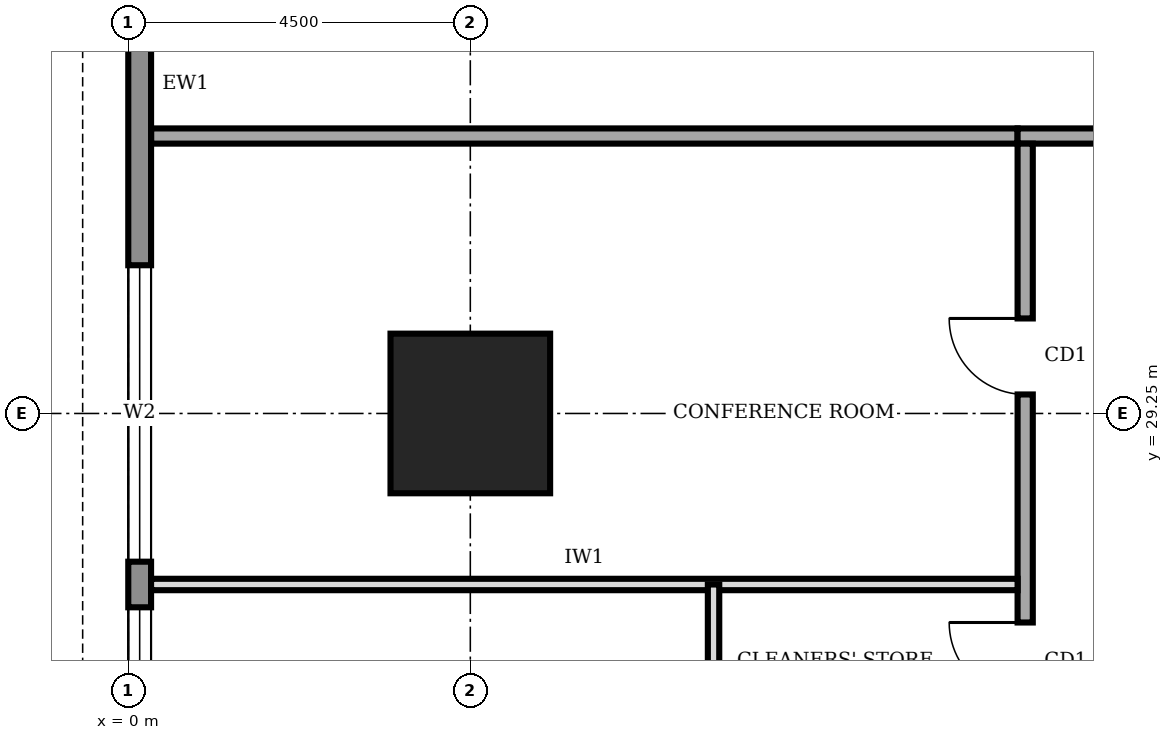
"""IFC4 building model, lengths in metres.
Left out: names, types, materials, properties, quantities, classifications, styles, units other than length and angle.
Written with IfcOpenShell. Run it as: python <this file> out.ifc"""

import sys

from ifc_helpers import new_model, si_unit, direction, frame, frame_2d, origin, origin_2d, place, context, subcontext, project, spatial, rectangle, extrude, element, fill, save


model = new_model("IFC4")
c1 = context("Model", 3, precision=1e-05, world=origin(), true_north=direction((0.0, 1.0)))
c2 = subcontext(c1, "Body", "Model", "MODEL_VIEW")
j1 = project(units=[si_unit("LENGTHUNIT", "METRE"), si_unit("PLANEANGLEUNIT", "RADIAN")], contexts=[c1])
p1 = place(None, origin())
s1 = spatial("IfcSite", under=j1, at=p1, CompositionType="ELEMENT")
p2 = place(p1, origin())
s2 = spatial("IfcBuilding", under=s1, at=p2, CompositionType="ELEMENT")
p3 = place(p2, frame((0.0, 0.0, 149.0)))
s3 = spatial("IfcBuildingStorey", under=s2, at=p3, CompositionType="ELEMENT", Elevation=149.0)
p4 = place(p3, frame((4.5, 29.25, 0.0), z_axis=(0.0, 0.0, 1.0), x_axis=(1.0, 0.0, 0.0)))
e1 = element("IfcColumn", 1, at=p4, inside=s3, PredefinedType="COLUMN", context=c2, shape_type="SweptSolid", body=[
    extrude(rectangle(XDim=2.1, YDim=2.1, at=origin_2d()), origin(), (0.0, 0.0, 1.0), 4.0),
])
p5 = place(p3, frame((0.15, 35.98, 0.0), z_axis=(0.0, 0.0, 1.0), x_axis=(0.0, -1.0, 0.0)))
e2 = element("IfcWall", 2, at=p5, inside=s3, PredefinedType="STANDARD", context=c2, shape_type="SweptSolid", body=[
    extrude(rectangle(XDim=31.46, YDim=0.3, at=frame_2d((15.73, 0.0))), origin(), (0.0, 0.0, 1.0), 3.75),
])
p6 = place(p5, frame((27.28, 0.0, 0.6)))
e3 = element("IfcOpeningElement", 3, at=p6, cuts=e2, PredefinedType="OPENING", context=c2, shape_type="SweptSolid", body=[
    extrude(rectangle(XDim=3.9, YDim=2.6, at=frame_2d((1.95, 1.3))), frame((0.0, 0.16, 0.0), z_axis=(0.0, -1.0, 0.0), x_axis=(1.0, 0.0, 0.0)), (0.0, 0.0, 1.0), 0.32),
])
p7 = place(p5, frame((22.78, 0.0, 0.6)))
e4 = element("IfcOpeningElement", 4, at=p7, cuts=e2, PredefinedType="OPENING", context=c2, shape_type="SweptSolid", body=[
    extrude(rectangle(XDim=3.9, YDim=2.6, at=frame_2d((1.95, 1.3))), frame((0.0, 0.16, 0.0), z_axis=(0.0, -1.0, 0.0), x_axis=(1.0, 0.0, 0.0)), (0.0, 0.0, 1.0), 0.32),
])
p8 = place(p5, frame((18.28, 0.0, 0.6)))
e5 = element("IfcOpeningElement", 5, at=p8, cuts=e2, PredefinedType="OPENING", context=c2, shape_type="SweptSolid", body=[
    extrude(rectangle(XDim=3.9, YDim=2.6, at=frame_2d((1.95, 1.3))), frame((0.0, 0.16, 0.0), z_axis=(0.0, -1.0, 0.0), x_axis=(1.0, 0.0, 0.0)), (0.0, 0.0, 1.0), 0.32),
])
p9 = place(p5, frame((13.78, 0.0, 0.6)))
e6 = element("IfcOpeningElement", 6, at=p9, cuts=e2, PredefinedType="OPENING", context=c2, shape_type="SweptSolid", body=[
    extrude(rectangle(XDim=3.9, YDim=2.6, at=frame_2d((1.95, 1.3))), frame((0.0, 0.16, 0.0), z_axis=(0.0, -1.0, 0.0), x_axis=(1.0, 0.0, 0.0)), (0.0, 0.0, 1.0), 0.32),
])
p10 = place(p5, frame((9.28, 0.0, 0.6)))
e7 = element("IfcOpeningElement", 7, at=p10, cuts=e2, PredefinedType="OPENING", context=c2, shape_type="SweptSolid", body=[
    extrude(rectangle(XDim=3.9, YDim=2.6, at=frame_2d((1.95, 1.3))), frame((0.0, 0.16, 0.0), z_axis=(0.0, -1.0, 0.0), x_axis=(1.0, 0.0, 0.0)), (0.0, 0.0, 1.0), 0.32),
])
p11 = place(p5, frame((4.78, 0.0, 0.6)))
e8 = element("IfcOpeningElement", 8, at=p11, cuts=e2, PredefinedType="OPENING", context=c2, shape_type="SweptSolid", body=[
    extrude(rectangle(XDim=3.9, YDim=2.6, at=frame_2d((1.95, 1.3))), frame((0.0, 0.16, 0.0), z_axis=(0.0, -1.0, 0.0), x_axis=(1.0, 0.0, 0.0)), (0.0, 0.0, 1.0), 0.32),
])
p12 = place(p3, frame((40.2, 32.9, 0.0), z_axis=(0.0, 0.0, 1.0), x_axis=(-1.0, 0.0, 0.0)))
e9 = element("IfcWall", 9, at=p12, inside=s3, PredefinedType="SOLIDWALL", context=c2, shape_type="SweptSolid", body=[
    extrude(rectangle(XDim=28.5, YDim=0.2, at=frame_2d((14.25, 0.0))), origin(), (0.0, 0.0, 1.0), 3.75),
])
p13 = place(p12, frame((24.55, 0.0, 0.0)))
e10 = element("IfcOpeningElement", 10, at=p13, cuts=e9, PredefinedType="OPENING", context=c2, shape_type="SweptSolid", body=[
    extrude(rectangle(XDim=1.8, YDim=2.1, at=frame_2d((0.9, 1.05))), frame((0.0, 0.11, 0.0), z_axis=(0.0, -1.0, 0.0), x_axis=(1.0, 0.0, 0.0)), (0.0, 0.0, 1.0), 0.22),
])
p14 = place(p12, frame((17.2, 0.0, 0.0)))
e11 = element("IfcOpeningElement", 11, at=p14, cuts=e9, PredefinedType="OPENING", context=c2, shape_type="SweptSolid", body=[
    extrude(rectangle(XDim=1.0, YDim=2.1, at=frame_2d((0.5, 1.05))), frame((0.0, 0.11, 0.0), z_axis=(0.0, -1.0, 0.0), x_axis=(1.0, 0.0, 0.0)), (0.0, 0.0, 1.0), 0.22),
])
p15 = place(p12, frame((6.0, 0.0, 0.0)))
e12 = element("IfcOpeningElement", 12, at=p15, cuts=e9, PredefinedType="OPENING", context=c2, shape_type="SweptSolid", body=[
    extrude(rectangle(XDim=1.0, YDim=2.1, at=frame_2d((0.5, 1.05))), frame((0.0, 0.11, 0.0), z_axis=(0.0, -1.0, 0.0), x_axis=(1.0, 0.0, 0.0)), (0.0, 0.0, 1.0), 0.22),
])
p16 = place(p3, frame((11.8, 32.8, 0.0), z_axis=(0.0, 0.0, 1.0), x_axis=(0.0, -1.0, 0.0)))
e13 = element("IfcWall", 13, at=p16, inside=s3, PredefinedType="SOLIDWALL", context=c2, shape_type="SweptSolid", body=[
    extrude(rectangle(XDim=25.3, YDim=0.2, at=frame_2d((12.65, 0.0))), origin(), (0.0, 0.0, 1.0), 3.75),
])
p17 = place(p16, frame((21.8, 0.0, 0.0)))
e14 = element("IfcOpeningElement", 14, at=p17, cuts=e13, PredefinedType="OPENING", context=c2, shape_type="SweptSolid", body=[
    extrude(rectangle(XDim=1.0, YDim=2.1, at=frame_2d((0.5, 1.05))), frame((0.0, 0.11, 0.0), z_axis=(0.0, -1.0, 0.0), x_axis=(1.0, 0.0, 0.0)), (0.0, 0.0, 1.0), 0.22),
])
p18 = place(p16, frame((17.15, 0.0, 0.0)))
e15 = element("IfcOpeningElement", 15, at=p18, cuts=e13, PredefinedType="OPENING", context=c2, shape_type="SweptSolid", body=[
    extrude(rectangle(XDim=0.9, YDim=2.1, at=frame_2d((0.45, 1.05))), frame((0.0, 0.11, 0.0), z_axis=(0.0, -1.0, 0.0), x_axis=(1.0, 0.0, 0.0)), (0.0, 0.0, 1.0), 0.22),
])
p19 = place(p16, frame((12.35, 0.0, 0.0)))
e16 = element("IfcOpeningElement", 16, at=p19, cuts=e13, PredefinedType="OPENING", context=c2, shape_type="SweptSolid", body=[
    extrude(rectangle(XDim=0.9, YDim=2.1, at=frame_2d((0.45, 1.05))), frame((0.0, 0.11, 0.0), z_axis=(0.0, -1.0, 0.0), x_axis=(1.0, 0.0, 0.0)), (0.0, 0.0, 1.0), 0.22),
])
p20 = place(p16, frame((9.3, 0.0, 0.0)))
e17 = element("IfcOpeningElement", 17, at=p20, cuts=e13, PredefinedType="OPENING", context=c2, shape_type="SweptSolid", body=[
    extrude(rectangle(XDim=0.9, YDim=2.1, at=frame_2d((0.45, 1.05))), frame((0.0, 0.11, 0.0), z_axis=(0.0, -1.0, 0.0), x_axis=(1.0, 0.0, 0.0)), (0.0, 0.0, 1.0), 0.22),
])
p21 = place(p16, frame((6.3, 0.0, 0.0)))
e18 = element("IfcOpeningElement", 18, at=p21, cuts=e13, PredefinedType="OPENING", context=c2, shape_type="SweptSolid", body=[
    extrude(rectangle(XDim=1.0, YDim=2.1, at=frame_2d((0.5, 1.05))), frame((0.0, 0.11, 0.0), z_axis=(0.0, -1.0, 0.0), x_axis=(1.0, 0.0, 0.0)), (0.0, 0.0, 1.0), 0.22),
])
p22 = place(p16, frame((14.4, 0.0, 0.0)))
e19 = element("IfcOpeningElement", 19, at=p22, cuts=e13, PredefinedType="OPENING", context=c2, shape_type="SweptSolid", body=[
    extrude(rectangle(XDim=1.0, YDim=2.1, at=frame_2d((0.5, 1.05))), frame((0.0, 0.11, 0.0), z_axis=(0.0, -1.0, 0.0), x_axis=(1.0, 0.0, 0.0)), (0.0, 0.0, 1.0), 0.22),
])
p23 = place(p16, frame((2.3, 0.0, 0.0)))
e20 = element("IfcOpeningElement", 20, at=p23, cuts=e13, PredefinedType="OPENING", context=c2, shape_type="SweptSolid", body=[
    extrude(rectangle(XDim=1.0, YDim=2.1, at=frame_2d((0.5, 1.05))), frame((0.0, 0.11, 0.0), z_axis=(0.0, -1.0, 0.0), x_axis=(1.0, 0.0, 0.0)), (0.0, 0.0, 1.0), 0.22),
])
p24 = place(p3, frame((0.3, 32.9, 0.0), z_axis=(0.0, 0.0, 1.0), x_axis=(1.0, 0.0, 0.0)))
e21 = element("IfcWall", 21, at=p24, inside=s3, PredefinedType="SOLIDWALL", context=c2, shape_type="SweptSolid", body=[
    extrude(rectangle(XDim=11.4, YDim=0.2, at=frame_2d((5.7, 0.0))), origin(), (0.0, 0.0, 1.0), 3.75),
])
p25 = place(p3, frame((0.3, 27.0, 0.0), z_axis=(0.0, 0.0, 1.0), x_axis=(1.0, 0.0, 0.0)))
e22 = element("IfcWall", 22, at=p25, inside=s3, PredefinedType="PARTITIONING", context=c2, shape_type="SweptSolid", body=[
    extrude(rectangle(XDim=11.4, YDim=0.15, at=frame_2d((5.7, 0.0))), origin(), (0.0, 0.0, 1.0), 3.75),
])
p26 = place(p3, frame((7.7, 25.0, 0.0), z_axis=(0.0, 0.0, 1.0), x_axis=(0.0, 1.0, 0.0)))
e23 = element("IfcWall", 23, at=p26, inside=s3, PredefinedType="PARTITIONING", context=c2, shape_type="SweptSolid", body=[
    extrude(rectangle(XDim=2.0, YDim=0.15, at=frame_2d((1.0, 0.0))), origin(), (0.0, 0.0, 1.0), 3.75),
])
p27 = place(p10, origin())
e24 = element("IfcWindow", 24, at=p27, inside=s3, PartitioningType="SINGLE_PANEL", PredefinedType="WINDOW", context=c2, shape_type="SweptSolid", body=[
    extrude(rectangle(XDim=3.9, YDim=2.6, at=frame_2d((1.95, 1.3))), frame((0.0, 0.03, 0.0), z_axis=(0.0, -1.0, 0.0), x_axis=(1.0, 0.0, 0.0)), (0.0, 0.0, 1.0), 0.06),
])
fill(e7, e24)
p28 = place(p11, origin())
e25 = element("IfcWindow", 25, at=p28, inside=s3, PartitioningType="SINGLE_PANEL", PredefinedType="WINDOW", context=c2, shape_type="SweptSolid", body=[
    extrude(rectangle(XDim=3.9, YDim=2.6, at=frame_2d((1.95, 1.3))), frame((0.0, 0.03, 0.0), z_axis=(0.0, -1.0, 0.0), x_axis=(1.0, 0.0, 0.0)), (0.0, 0.0, 1.0), 0.06),
])
fill(e8, e25)
p29 = place(p21, frame((1.0, 0.0, 0.0), z_axis=(0.0, 0.0, 1.0), x_axis=(-1.0, 0.0, 0.0)))
e26 = element("IfcDoor", 26, at=p29, inside=s3, OperationType="SINGLE_SWING_RIGHT", PredefinedType="DOOR", context=c2, shape_type="SweptSolid", body=[
    extrude(rectangle(XDim=1.0, YDim=2.1, at=frame_2d((0.5, 1.05))), frame((0.0, 0.025, 0.0), z_axis=(0.0, -1.0, 0.0), x_axis=(1.0, 0.0, 0.0)), (0.0, 0.0, 1.0), 0.05),
])
fill(e18, e26)
p30 = place(p23, frame((1.0, 0.0, 0.0), z_axis=(0.0, 0.0, 1.0), x_axis=(-1.0, 0.0, 0.0)))
e27 = element("IfcDoor", 27, at=p30, inside=s3, OperationType="SINGLE_SWING_RIGHT", PredefinedType="DOOR", context=c2, shape_type="SweptSolid", body=[
    extrude(rectangle(XDim=1.0, YDim=2.1, at=frame_2d((0.5, 1.05))), frame((0.0, 0.025, 0.0), z_axis=(0.0, -1.0, 0.0), x_axis=(1.0, 0.0, 0.0)), (0.0, 0.0, 1.0), 0.05),
])
fill(e20, e27)
save(model, sys.argv[1])
